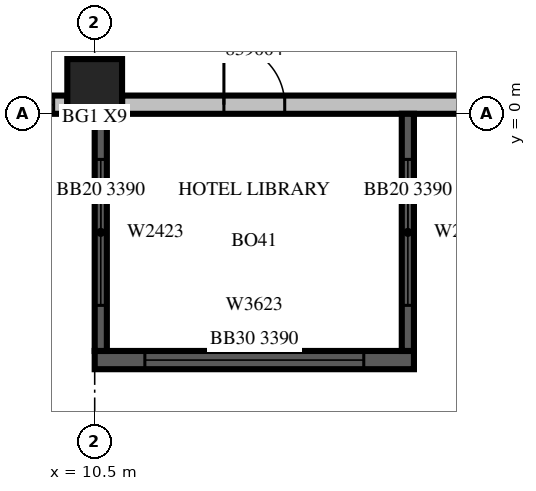
"""IFC4 building model, lengths in metres.
Left out: names, types, materials, properties, quantities, classifications, styles, units other than length and angle.
Written with IfcOpenShell. Run it as: python <this file> out.ifc"""

import sys

from ifc_helpers import new_model, si_unit, direction, frame, frame_2d, origin, origin_2d, place, context, subcontext, project, spatial, rectangle, extrude, source, transform, mapped, element, fill, save


model = new_model("IFC4")
c1 = context("Model", 3, precision=1e-05, world=origin(), true_north=direction((0.0, 1.0)))
c2 = subcontext(c1, "Body", "Model", "MODEL_VIEW")
j1 = project(units=[si_unit("LENGTHUNIT", "METRE"), si_unit("PLANEANGLEUNIT", "RADIAN")], contexts=[c1])
p1 = place(None, origin())
s1 = spatial("IfcSite", under=j1, at=p1, CompositionType="ELEMENT")
p2 = place(p1, origin())
s2 = spatial("IfcBuilding", under=s1, at=p2, CompositionType="ELEMENT")
p3 = place(p2, frame((0.0, 0.0, 181.6)))
s3 = spatial("IfcBuildingStorey", under=s2, at=p3, CompositionType="ELEMENT", Elevation=181.6)
m1 = source(origin(), c2, "Body", "SweptSolid", [
    extrude(rectangle(XDim=0.9, YDim=0.9, at=origin_2d()), origin(), (0.0, 0.0, 1.0), 3.8),
])
p4 = place(p3, frame((10.5, 0.45, 0.0), z_axis=(0.0, 0.0, 1.0), x_axis=(1.0, 0.0, 0.0)))
e1 = element("IfcColumn", 1, at=p4, inside=s3, PredefinedType="COLUMN", context=c2, shape_type="MappedRepresentation", body=[
    mapped(m1, transform((0.0, 0.0, 0.0), scale=1.0)),
])
p5 = place(p3, frame((4.2, 0.15, 0.0), z_axis=(0.0, 0.0, 1.0), x_axis=(1.0, 0.0, 0.0)))
e2 = element("IfcWall", 2, at=p5, inside=s3, PredefinedType="STANDARD", context=c2, shape_type="SweptSolid", body=[
    extrude(rectangle(XDim=5.85, YDim=0.3, at=frame_2d((2.925, 0.0))), origin(), (0.0, 0.0, 1.0), 3.4),
])
m2 = source(origin(), c2, "Body", "SweptSolid", [
    extrude(rectangle(XDim=1.8, YDim=2.3, at=frame_2d((0.9, 1.15))), frame((0.0, 0.16, 0.0), z_axis=(0.0, -1.0, 0.0), x_axis=(1.0, 0.0, 0.0)), (0.0, 0.0, 1.0), 0.32),
])
p6 = place(p5, frame((0.675, 0.0, 0.6)))
e3 = element("IfcOpeningElement", 3, at=p6, cuts=e2, PredefinedType="OPENING", context=c2, shape_type="MappedRepresentation", body=[
    mapped(m2, transform((0.0, 0.0, 0.0), scale=1.0)),
])
p7 = place(p5, frame((3.825, 0.0, 0.6)))
e4 = element("IfcOpeningElement", 4, at=p7, cuts=e2, PredefinedType="OPENING", context=c2, shape_type="MappedRepresentation", body=[
    mapped(m2, transform((0.0, 0.0, 0.0), scale=1.0)),
])
p8 = place(p3, frame((10.95, 0.15, 0.0), z_axis=(0.0, 0.0, 1.0), x_axis=(1.0, 0.0, 0.0)))
e5 = element("IfcWall", 5, at=p8, inside=s3, PredefinedType="STANDARD", context=c2, shape_type="SweptSolid", body=[
    extrude(rectangle(XDim=9.6, YDim=0.3, at=frame_2d((4.8, 0.0))), origin(), (0.0, 0.0, 1.0), 3.4),
])
m3 = source(origin(), c2, "Body", "SweptSolid", [
    extrude(rectangle(XDim=3.6, YDim=2.3, at=frame_2d((1.8, 1.15))), frame((0.0, 0.16, 0.0), z_axis=(0.0, -1.0, 0.0), x_axis=(1.0, 0.0, 0.0)), (0.0, 0.0, 1.0), 0.32),
])
p9 = place(p8, frame((5.625, 0.0, 0.6)))
e6 = element("IfcOpeningElement", 6, at=p9, cuts=e5, PredefinedType="OPENING", context=c2, shape_type="MappedRepresentation", body=[
    mapped(m3, transform((0.0, 0.0, 0.0), scale=1.0)),
])
m4 = source(origin(), c2, "Body", "SweptSolid", [
    extrude(rectangle(XDim=1.0, YDim=2.1, at=frame_2d((0.5, 1.05))), frame((0.0, 0.16, 0.0), z_axis=(0.0, -1.0, 0.0), x_axis=(1.0, 0.0, 0.0)), (0.0, 0.0, 1.0), 0.32),
])
p10 = place(p8, frame((1.675, 0.0, 0.0)))
e7 = element("IfcOpeningElement", 7, at=p10, cuts=e5, PredefinedType="OPENING", context=c2, shape_type="MappedRepresentation", body=[
    mapped(m4, transform((0.0, 0.0, 0.0), scale=1.0)),
])
p11 = place(p3, frame((10.5, -4.05, 0.0), z_axis=(0.0, 0.0, 1.0), x_axis=(1.0, 0.0, 0.0)))
e8 = element("IfcWall", 8, at=p11, inside=s3, PredefinedType="SOLIDWALL", context=c2, shape_type="SweptSolid", body=[
    extrude(rectangle(XDim=5.25, YDim=0.3, at=frame_2d((2.625, 0.0))), origin(), (0.0, 0.0, 1.0), 3.39),
])
p12 = place(p11, frame((0.825, 0.0, 0.6)))
e9 = element("IfcOpeningElement", 9, at=p12, cuts=e8, PredefinedType="OPENING", context=c2, shape_type="MappedRepresentation", body=[
    mapped(m3, transform((0.0, 0.0, 0.0), scale=1.0)),
])
m5 = source(origin(), c2, "Body", "SweptSolid", [
    extrude(rectangle(XDim=3.9, YDim=0.2, at=frame_2d((1.95, 0.0))), origin(), (0.0, 0.0, 1.0), 3.39),
])
p13 = place(p3, frame((10.6, 0.0, 0.0), z_axis=(0.0, 0.0, 1.0), x_axis=(0.0, -1.0, 0.0)))
e10 = element("IfcWall", 10, at=p13, inside=s3, PredefinedType="SOLIDWALL", context=c2, shape_type="MappedRepresentation", body=[
    mapped(m5, transform((0.0, 0.0, 0.0), scale=1.0)),
])
m6 = source(origin(), c2, "Body", "SweptSolid", [
    extrude(rectangle(XDim=2.4, YDim=2.3, at=frame_2d((1.2, 1.15))), frame((0.0, 0.11, 0.0), z_axis=(0.0, -1.0, 0.0), x_axis=(1.0, 0.0, 0.0)), (0.0, 0.0, 1.0), 0.22),
])
p14 = place(p13, frame((0.75, 0.0, 0.6)))
e11 = element("IfcOpeningElement", 11, at=p14, cuts=e10, PredefinedType="OPENING", context=c2, shape_type="MappedRepresentation", body=[
    mapped(m6, transform((0.0, 0.0, 0.0), scale=1.0)),
])
p15 = place(p3, frame((15.65, 0.0, 0.0), z_axis=(0.0, 0.0, 1.0), x_axis=(0.0, -1.0, 0.0)))
e12 = element("IfcWall", 12, at=p15, inside=s3, PredefinedType="SOLIDWALL", context=c2, shape_type="MappedRepresentation", body=[
    mapped(m5, transform((0.0, 0.0, 0.0), scale=1.0)),
])
p16 = place(p15, frame((0.75, 0.0, 0.6)))
e13 = element("IfcOpeningElement", 13, at=p16, cuts=e12, PredefinedType="OPENING", context=c2, shape_type="MappedRepresentation", body=[
    mapped(m6, transform((0.0, 0.0, 0.0), scale=1.0)),
])
m7 = source(origin(), c2, "Body", "SweptSolid", [
    extrude(rectangle(XDim=1.8, YDim=2.3, at=frame_2d((0.9, 1.15))), frame((0.0, 0.03, 0.0), z_axis=(0.0, -1.0, 0.0), x_axis=(1.0, 0.0, 0.0)), (0.0, 0.0, 1.0), 0.06),
])
p17 = place(p7, origin())
e14 = element("IfcWindow", 14, at=p17, inside=s3, PartitioningType="SINGLE_PANEL", PredefinedType="WINDOW", context=c2, shape_type="MappedRepresentation", body=[
    mapped(m7, transform((0.0, 0.0, 0.0), scale=1.0)),
])
fill(e4, e14)
m8 = source(origin(), c2, "Body", "SweptSolid", [
    extrude(rectangle(XDim=3.6, YDim=2.3, at=frame_2d((1.8, 1.15))), frame((0.0, 0.03, 0.0), z_axis=(0.0, -1.0, 0.0), x_axis=(1.0, 0.0, 0.0)), (0.0, 0.0, 1.0), 0.06),
])
p18 = place(p12, origin())
e15 = element("IfcWindow", 15, at=p18, inside=s3, PartitioningType="SINGLE_PANEL", PredefinedType="WINDOW", context=c2, shape_type="MappedRepresentation", body=[
    mapped(m8, transform((0.0, 0.0, 0.0), scale=1.0)),
])
fill(e9, e15)
m9 = source(origin(), c2, "Body", "SweptSolid", [
    extrude(rectangle(XDim=2.4, YDim=2.3, at=frame_2d((1.2, 1.15))), frame((0.0, 0.03, 0.0), z_axis=(0.0, -1.0, 0.0), x_axis=(1.0, 0.0, 0.0)), (0.0, 0.0, 1.0), 0.06),
])
p19 = place(p14, origin())
e16 = element("IfcWindow", 16, at=p19, inside=s3, PartitioningType="SINGLE_PANEL", PredefinedType="WINDOW", context=c2, shape_type="MappedRepresentation", body=[
    mapped(m9, transform((0.0, 0.0, 0.0), scale=1.0)),
])
fill(e11, e16)
p20 = place(p16, origin())
e17 = element("IfcWindow", 17, at=p20, inside=s3, PartitioningType="SINGLE_PANEL", PredefinedType="WINDOW", context=c2, shape_type="MappedRepresentation", body=[
    mapped(m9, transform((0.0, 0.0, 0.0), scale=1.0)),
])
fill(e13, e17)
m10 = source(origin(), c2, "Body", "SweptSolid", [
    extrude(rectangle(XDim=1.0, YDim=2.1, at=frame_2d((0.5, 1.05))), frame((0.0, 0.025, 0.0), z_axis=(0.0, -1.0, 0.0), x_axis=(1.0, 0.0, 0.0)), (0.0, 0.0, 1.0), 0.05),
])
p21 = place(p10, origin())
e18 = element("IfcDoor", 18, at=p21, inside=s3, OperationType="SINGLE_SWING_LEFT", PredefinedType="DOOR", context=c2, shape_type="MappedRepresentation", body=[
    mapped(m10, transform((0.0, 0.0, 0.0), scale=1.0)),
])
fill(e7, e18)
save(model, sys.argv[1])
